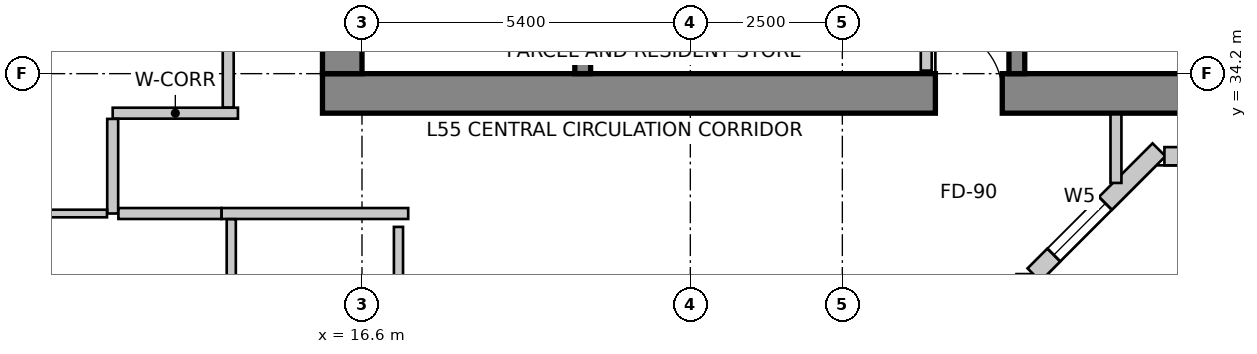
"""IFC4 building model, lengths in metres.
Left out: names, types, materials, properties, quantities, classifications, styles, units other than length and angle.
Written with IfcOpenShell. Run it as: python <this file> out.ifc"""

import sys

from ifc_helpers import new_model, si_unit, direction, frame, frame_2d, origin, place, context, subcontext, project, spatial, rectangle, extrude, source, transform, mapped, element, fill, save


model = new_model("IFC4")
c1 = context("Model", 3, precision=1e-05, world=origin(), true_north=direction((0.0, 1.0)))
c2 = subcontext(c1, "Body", "Model", "MODEL_VIEW")
j1 = project(units=[si_unit("LENGTHUNIT", "METRE"), si_unit("PLANEANGLEUNIT", "RADIAN")], contexts=[c1])
p1 = place(None, origin())
s1 = spatial("IfcSite", under=j1, at=p1, CompositionType="ELEMENT")
p2 = place(p1, origin())
s2 = spatial("IfcBuilding", under=s1, at=p2, CompositionType="ELEMENT")
p3 = place(p2, frame((0.0, 0.0, 218.4)))
s3 = spatial("IfcBuildingStorey", under=s2, at=p3, CompositionType="ELEMENT", Elevation=218.4)
p4 = place(p3, frame((15.95, 33.875, 0.0), z_axis=(0.0, 0.0, 1.0), x_axis=(1.0, 0.0, 0.0)))
e1 = element("IfcWall", 1, at=p4, inside=s3, PredefinedType="SHEAR", context=c2, shape_type="SweptSolid", body=[
    extrude(rectangle(XDim=15.7, YDim=0.65, at=frame_2d((7.85, 0.0))), origin(), (0.0, 0.0, 1.0), 3.5),
])
m1 = source(origin(), c2, "Body", "SweptSolid", [
    extrude(rectangle(XDim=1.1, YDim=2.15, at=frame_2d((0.55, 1.075))), frame((0.0, 0.335, 0.0), z_axis=(0.0, -1.0, 0.0), x_axis=(1.0, 0.0, 0.0)), (0.0, 0.0, 1.0), 0.67),
])
p5 = place(p4, frame((10.08, 0.0, 0.0)))
e2 = element("IfcOpeningElement", 2, at=p5, cuts=e1, PredefinedType="OPENING", context=c2, shape_type="MappedRepresentation", body=[
    mapped(m1, transform((0.0, 0.0, 0.0), scale=1.0)),
])
p6 = place(p3, frame((16.275, 34.2, 0.0), z_axis=(0.0, 0.0, 1.0), x_axis=(0.0, 1.0, 0.0)))
e3 = element("IfcWall", 3, at=p6, inside=s3, PredefinedType="SHEAR", context=c2, shape_type="SweptSolid", body=[
    extrude(rectangle(XDim=11.4, YDim=0.65, at=frame_2d((5.7, 0.0))), origin(), (0.0, 0.0, 1.0), 3.5),
])
p7 = place(p6, frame((7.15, 0.0, 0.0)))
e4 = element("IfcOpeningElement", 4, at=p7, cuts=e3, PredefinedType="OPENING", context=c2, shape_type="MappedRepresentation", body=[
    mapped(m1, transform((0.0, 0.0, 0.0), scale=1.0)),
])
p8 = place(p3, frame((20.23, 34.2, 0.0), z_axis=(0.0, 0.0, 1.0), x_axis=(0.0, 1.0, 0.0)))
e5 = element("IfcWall", 5, at=p8, inside=s3, PredefinedType="SHEAR", context=c2, shape_type="SweptSolid", body=[
    extrude(rectangle(XDim=9.06, YDim=0.26, at=frame_2d((4.53, 0.0))), origin(), (0.0, 0.0, 1.0), 3.5),
])
m2 = source(origin(), c2, "Body", "SweptSolid", [
    extrude(rectangle(XDim=1.1, YDim=2.15, at=frame_2d((0.55, 1.075))), frame((0.0, 0.14, 0.0), z_axis=(0.0, -1.0, 0.0), x_axis=(1.0, 0.0, 0.0)), (0.0, 0.0, 1.0), 0.28),
])
p9 = place(p8, frame((7.45, 0.0, 0.0)))
e6 = element("IfcOpeningElement", 6, at=p9, cuts=e5, PredefinedType="OPENING", context=c2, shape_type="MappedRepresentation", body=[
    mapped(m2, transform((0.0, 0.0, 0.0), scale=1.0)),
])
p10 = place(p3, frame((27.37, 34.2, 0.0), z_axis=(0.0, 0.0, 1.0), x_axis=(0.0, 1.0, 0.0)))
e7 = element("IfcWall", 7, at=p10, inside=s3, PredefinedType="SHEAR", context=c2, shape_type="SweptSolid", body=[
    extrude(rectangle(XDim=9.06, YDim=0.26, at=frame_2d((4.53, 0.0))), origin(), (0.0, 0.0, 1.0), 3.5),
])
p11 = place(p10, frame((7.45, 0.0, 0.0)))
e8 = element("IfcOpeningElement", 8, at=p11, cuts=e7, PredefinedType="OPENING", context=c2, shape_type="MappedRepresentation", body=[
    mapped(m2, transform((0.0, 0.0, 0.0), scale=1.0)),
])
p12 = place(p3, frame((27.514, 29.677, 0.0), z_axis=(0.0, 0.0, 1.0), x_axis=(0.0, 1.0, 0.0)))
e9 = element("IfcWall", 9, at=p12, inside=s3, PredefinedType="SOLIDWALL", context=c2, shape_type="SweptSolid", body=[
    extrude(rectangle(XDim=1.228, YDim=0.3, at=frame_2d((0.614, 0.0))), origin(), (0.0, 0.0, 1.0), 3.25),
])
p13 = place(p3, frame((27.652, 30.892, 0.0), z_axis=(0.0, 0.0, 1.0), x_axis=(0.707106781187, 0.707106781187, 0.0)))
e10 = element("IfcWall", 10, at=p13, inside=s3, PredefinedType="SOLIDWALL", context=c2, shape_type="SweptSolid", body=[
    extrude(rectangle(XDim=2.907, YDim=0.3, at=frame_2d((1.454, 0.0))), origin(), (0.0, 0.0, 1.0), 3.25),
])
m3 = source(origin(), c2, "Body", "SweptSolid", [
    extrude(rectangle(XDim=1.2, YDim=1.6, at=frame_2d((0.6, 0.8))), frame((0.0, 0.16, 0.0), z_axis=(0.0, -1.0, 0.0), x_axis=(1.0, 0.0, 0.0)), (0.0, 0.0, 1.0), 0.32),
])
p14 = place(p13, frame((0.461, 0.0, 0.85)))
e11 = element("IfcOpeningElement", 11, at=p14, cuts=e10, PredefinedType="OPENING", context=c2, shape_type="MappedRepresentation", body=[
    mapped(m3, transform((0.0, 0.0, 0.0), scale=1.0)),
])
p15 = place(p3, frame((29.797, 32.842, 0.0), z_axis=(0.0, 0.0, 1.0), x_axis=(1.0, 0.0, 0.0)))
e12 = element("IfcWall", 12, at=p15, inside=s3, PredefinedType="SOLIDWALL", context=c2, shape_type="SweptSolid", body=[
    extrude(rectangle(XDim=0.882, YDim=0.3, at=frame_2d((0.441, 0.0))), origin(), (0.0, 0.0, 1.0), 3.25),
])
p16 = place(p3, frame((13.269, 47.134, 0.0), z_axis=(0.0, 0.0, 1.0), x_axis=(-0.319920776449, -0.947444297464, 0.0)))
e13 = element("IfcWall", 13, at=p16, inside=s3, PredefinedType="SOLIDWALL", context=c2, shape_type="SweptSolid", body=[
    extrude(rectangle(XDim=16.133, YDim=0.3, at=frame_2d((8.067, 0.0))), origin(), (0.0, 0.0, 1.0), 3.25),
])
m4 = source(origin(), c2, "Body", "SweptSolid", [
    extrude(rectangle(XDim=2.1, YDim=2.0, at=frame_2d((1.05, 1.0))), frame((0.0, 0.16, 0.0), z_axis=(0.0, -1.0, 0.0), x_axis=(1.0, 0.0, 0.0)), (0.0, 0.0, 1.0), 0.32),
])
p17 = place(p16, frame((2.513, 0.0, 0.85)))
e14 = element("IfcOpeningElement", 14, at=p17, cuts=e13, PredefinedType="OPENING", context=c2, shape_type="MappedRepresentation", body=[
    mapped(m4, transform((0.0, 0.0, 0.0), scale=1.0)),
])
m5 = source(origin(), c2, "Body", "SweptSolid", [
    extrude(rectangle(XDim=2.4, YDim=2.2, at=frame_2d((1.2, 1.1))), frame((0.0, 0.16, 0.0), z_axis=(0.0, -1.0, 0.0), x_axis=(1.0, 0.0, 0.0)), (0.0, 0.0, 1.0), 0.32),
])
p18 = place(p16, frame((7.26, 0.0, 0.85)))
e15 = element("IfcOpeningElement", 15, at=p18, cuts=e13, PredefinedType="OPENING", context=c2, shape_type="MappedRepresentation", body=[
    mapped(m5, transform((0.0, 0.0, 0.0), scale=1.0)),
])
p19 = place(p16, frame((12.307, 0.0, 0.85)))
e16 = element("IfcOpeningElement", 16, at=p19, cuts=e13, PredefinedType="OPENING", context=c2, shape_type="MappedRepresentation", body=[
    mapped(m4, transform((0.0, 0.0, 0.0), scale=1.0)),
])
p20 = place(p3, frame((8.188, 31.834, 0.0), z_axis=(0.0, 0.0, 1.0), x_axis=(0.202303475707, -0.979322880217, 0.0)))
e17 = element("IfcWall", 17, at=p20, inside=s3, PredefinedType="SOLIDWALL", context=c2, shape_type="SweptSolid", body=[
    extrude(rectangle(XDim=15.766, YDim=0.3, at=frame_2d((7.883, 0.0))), origin(), (0.0, 0.0, 1.0), 3.25),
])
p21 = place(p20, frame((1.257, 0.0, 0.85)))
e18 = element("IfcOpeningElement", 18, at=p21, cuts=e17, PredefinedType="OPENING", context=c2, shape_type="MappedRepresentation", body=[
    mapped(m5, transform((0.0, 0.0, 0.0), scale=1.0)),
])
p22 = place(p20, frame((6.044, 0.0, 0.85)))
e19 = element("IfcOpeningElement", 19, at=p22, cuts=e17, PredefinedType="OPENING", context=c2, shape_type="MappedRepresentation", body=[
    mapped(m5, transform((0.0, 0.0, 0.0), scale=1.0)),
])
p23 = place(p20, frame((10.904, 0.0, 0.85)))
e20 = element("IfcOpeningElement", 20, at=p23, cuts=e17, PredefinedType="OPENING", context=c2, shape_type="MappedRepresentation", body=[
    mapped(m5, transform((0.0, 0.0, 0.0), scale=1.0)),
])
p24 = place(p3, frame((25.88, 35.956, 0.0), z_axis=(0.0, 0.0, 1.0), x_axis=(0.0, -1.0, 0.0)))
e21 = element("IfcWall", 21, at=p24, inside=s3, PredefinedType="PARTITIONING", context=c2, shape_type="SweptSolid", body=[
    extrude(rectangle(XDim=1.706, YDim=0.18, at=frame_2d((0.853, 0.0))), origin(), (0.0, 0.0, 1.0), 2.542),
])
p25 = place(p3, frame((12.5, 33.55, 0.0), z_axis=(0.0, 0.0, 1.0), x_axis=(1.0, 0.0, 0.0)))
e22 = element("IfcWall", 22, at=p25, inside=s3, PredefinedType="PARTITIONING", context=c2, shape_type="SweptSolid", body=[
    extrude(rectangle(XDim=2.06, YDim=0.18, at=frame_2d((1.03, 0.0))), origin(), (0.0, 0.0, 1.0), 3.25),
])
p26 = place(p3, frame((12.5, 31.9, 0.0), z_axis=(0.0, 0.0, 1.0), x_axis=(0.0, 1.0, 0.0)))
e23 = element("IfcWall", 23, at=p26, inside=s3, PredefinedType="PARTITIONING", context=c2, shape_type="SweptSolid", body=[
    extrude(rectangle(XDim=1.556, YDim=0.18, at=frame_2d((0.778, 0.0))), origin(), (0.0, 0.0, 1.0), 2.919),
])
p27 = place(p3, frame((29.0, 33.53, 0.0), z_axis=(0.0, 0.0, 1.0), x_axis=(0.0, -1.0, 0.0)))
e24 = element("IfcWall", 24, at=p27, inside=s3, PredefinedType="PARTITIONING", context=c2, shape_type="SweptSolid", body=[
    extrude(rectangle(XDim=1.127, YDim=0.18, at=frame_2d((0.563, 0.0))), origin(), (0.0, 0.0, 1.0), 3.25),
])
p28 = place(p3, frame((17.36, 31.9, 0.0), z_axis=(0.0, 0.0, 1.0), x_axis=(-1.0, 0.0, 0.0)))
e25 = element("IfcWall", 25, at=p28, inside=s3, PredefinedType="PARTITIONING", context=c2, shape_type="SweptSolid", body=[
    extrude(rectangle(XDim=3.07, YDim=0.18, at=frame_2d((1.535, 0.0))), origin(), (0.0, 0.0, 1.0), 2.919),
])
p29 = place(p3, frame((14.288, 31.9, 0.0), z_axis=(0.0, 0.0, 1.0), x_axis=(-1.0, 0.0, 0.0)))
e26 = element("IfcWall", 26, at=p29, inside=s3, PredefinedType="PARTITIONING", context=c2, shape_type="SweptSolid", body=[
    extrude(rectangle(XDim=1.694, YDim=0.18, at=frame_2d((0.847, 0.0))), origin(), (0.0, 0.0, 1.0), 2.919),
])
p30 = place(p3, frame((14.4, 33.644, 0.0), z_axis=(0.0, 0.0, 1.0), x_axis=(0.0, 1.0, 0.0)))
e27 = element("IfcWall", 27, at=p30, inside=s3, PredefinedType="PARTITIONING", context=c2, shape_type="SweptSolid", body=[
    extrude(rectangle(XDim=12.606, YDim=0.18, at=frame_2d((6.303, 0.0))), origin(), (0.0, 0.0, 1.0), 3.25),
])
m6 = source(origin(), c2, "Body", "SweptSolid", [
    extrude(rectangle(XDim=0.9, YDim=2.15, at=frame_2d((0.45, 1.075))), frame((0.0, 0.1, 0.0), z_axis=(0.0, -1.0, 0.0), x_axis=(1.0, 0.0, 0.0)), (0.0, 0.0, 1.0), 0.2),
])
p31 = place(p30, frame((4.399, 0.0, 0.0)))
e28 = element("IfcOpeningElement", 28, at=p31, cuts=e27, PredefinedType="OPENING", context=c2, shape_type="MappedRepresentation", body=[
    mapped(m6, transform((0.0, 0.0, 0.0), scale=1.0)),
])
p32 = place(p3, frame((12.406, 31.9, 0.0), z_axis=(0.0, 0.0, 1.0), x_axis=(-1.0, 0.0, 0.0)))
e29 = element("IfcWall", 29, at=p32, inside=s3, PredefinedType="PARTITIONING", context=c2, shape_type="SweptSolid", body=[
    extrude(rectangle(XDim=4.115, YDim=0.125, at=frame_2d((2.057, 0.0))), origin(), (0.0, 0.0, 1.0), 2.542),
])
p33 = place(p3, frame((14.45, 27.221, 0.0), z_axis=(0.0, 0.0, 1.0), x_axis=(0.0, 1.0, 0.0)))
e30 = element("IfcWall", 30, at=p33, inside=s3, PredefinedType="PARTITIONING", context=c2, shape_type="SweptSolid", body=[
    extrude(rectangle(XDim=4.585, YDim=0.15, at=frame_2d((2.292, 0.0))), origin(), (0.0, 0.0, 1.0), 2.766),
])
p34 = place(p3, frame((17.2, 31.68, 0.0), z_axis=(0.0, 0.0, 1.0), x_axis=(0.0, -1.0, 0.0)))
e31 = element("IfcWall", 31, at=p34, inside=s3, PredefinedType="PARTITIONING", context=c2, shape_type="SweptSolid", body=[
    extrude(rectangle(XDim=4.318, YDim=0.15, at=frame_2d((2.159, 0.0))), origin(), (0.0, 0.0, 1.0), 2.766),
])
m7 = source(origin(), c2, "Body", "SweptSolid", [
    extrude(rectangle(XDim=1.2, YDim=1.6, at=frame_2d((0.6, 0.8))), frame((0.0, -0.015, 0.0), z_axis=(0.0, -1.0, 0.0), x_axis=(1.0, 0.0, 0.0)), (0.0, 0.0, 1.0), 0.06),
])
p35 = place(p14, origin())
e32 = element("IfcWindow", 32, at=p35, inside=s3, PartitioningType="SINGLE_PANEL", PredefinedType="WINDOW", context=c2, shape_type="MappedRepresentation", body=[
    mapped(m7, transform((0.0, 0.0, 0.0), scale=1.0)),
])
fill(e11, e32)
m8 = source(origin(), c2, "Body", "SweptSolid", [
    extrude(rectangle(XDim=1.1, YDim=2.15, at=frame_2d((0.55, 1.075))), frame((0.0, 0.025, 0.0), z_axis=(0.0, -1.0, 0.0), x_axis=(1.0, 0.0, 0.0)), (0.0, 0.0, 1.0), 0.05),
])
p36 = place(p5, origin())
e33 = element("IfcDoor", 33, at=p36, inside=s3, OperationType="SINGLE_SWING_LEFT", PredefinedType="DOOR", context=c2, shape_type="MappedRepresentation", body=[
    mapped(m8, transform((0.0, 0.0, 0.0), scale=1.0)),
])
fill(e2, e33)
save(model, sys.argv[1])
